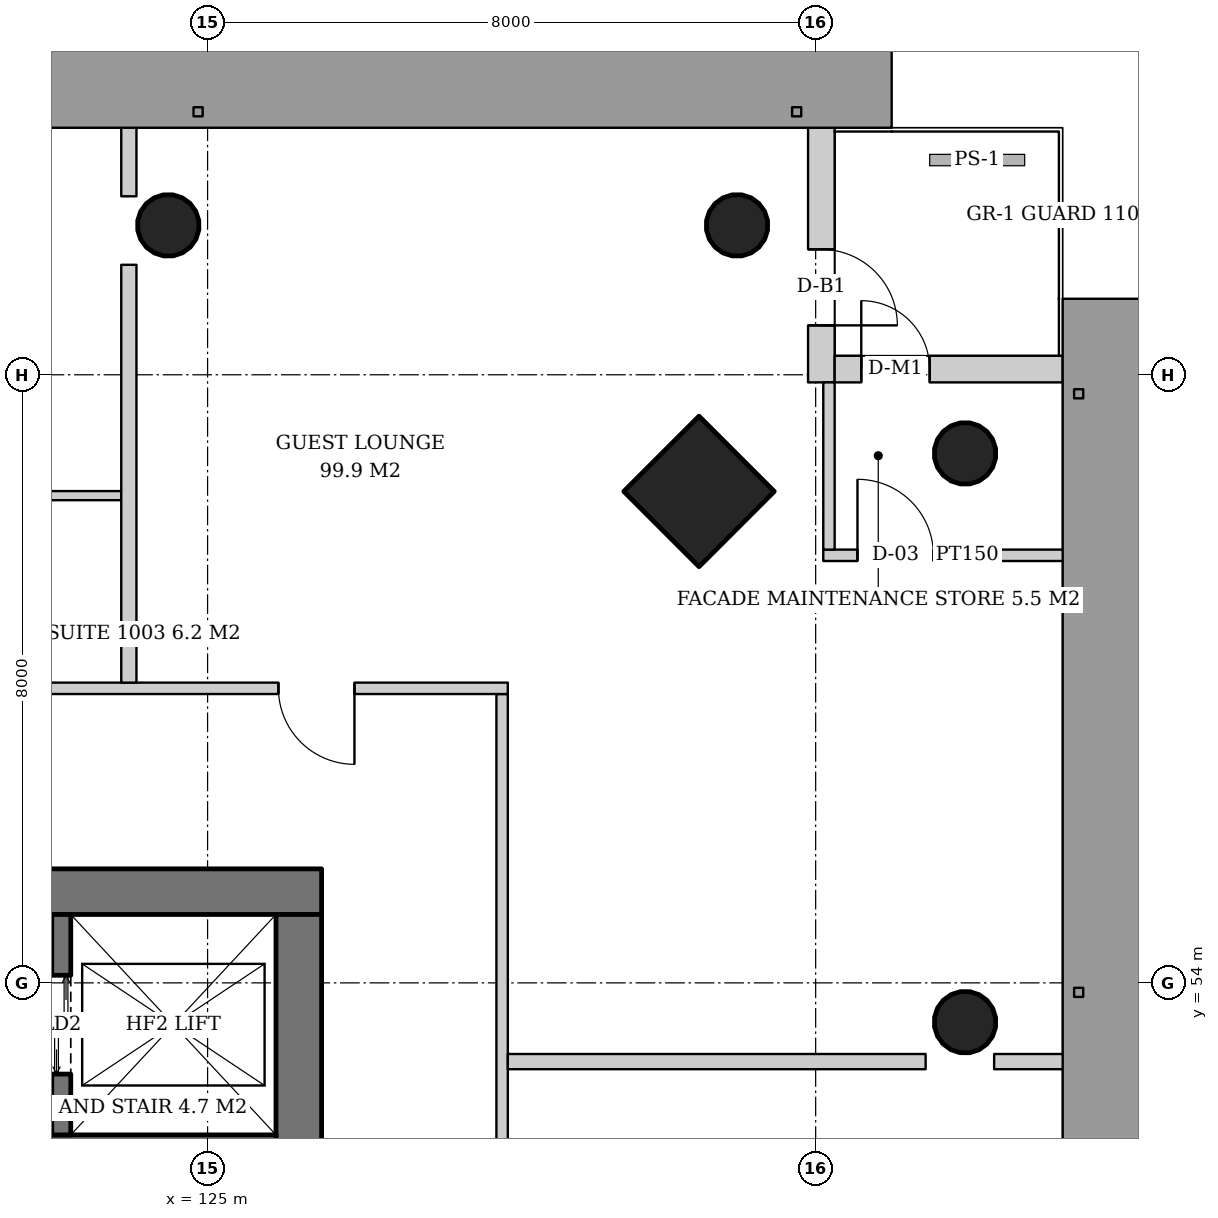
"""IFC4 building model, lengths in metres.
Left out: names, types, materials, properties, quantities, classifications, styles, units other than length and angle.
Written with IfcOpenShell. Run it as: python <this file> out.ifc"""

import sys

from ifc_helpers import new_model, si_unit, direction, frame, frame_2d, origin, origin_2d, place, context, subcontext, project, spatial, rectangle, hollow_circle, extrude, element, fill, save


model = new_model("IFC4")
c1 = context("Model", 3, precision=1e-05, world=origin(), true_north=direction((0.0, 1.0)))
c2 = subcontext(c1, "Body", "Model", "MODEL_VIEW")
j1 = project(units=[si_unit("LENGTHUNIT", "METRE"), si_unit("PLANEANGLEUNIT", "RADIAN")], contexts=[c1])
p1 = place(None, origin())
s1 = spatial("IfcSite", under=j1, at=p1, CompositionType="ELEMENT")
p2 = place(p1, origin())
s2 = spatial("IfcBuilding", under=s1, at=p2, CompositionType="ELEMENT")
p3 = place(p2, frame((0.0, 0.0, 43.8)))
s3 = spatial("IfcBuildingStorey", under=s2, at=p3, CompositionType="ELEMENT", Elevation=43.8)
p4 = place(p3, frame((131.517, 60.517, 0.0), z_axis=(-0.043029647111, -0.043029647111, 0.998146732169), x_axis=(0.707106781187, -0.707106781187, 0.0)))
e1 = element("IfcColumn", 1, at=p4, inside=s3, PredefinedType="COLUMN", context=c2, shape_type="SweptSolid", body=[
    extrude(rectangle(XDim=1.4, YDim=1.4, at=origin_2d()), origin(), (0.0, 0.0, 1.0), 3.807),
])
p5 = place(p3, frame((135.017, 61.017, 0.0), z_axis=(-0.043029647111, -0.043029647111, 0.998146732169), x_axis=(0.707106781187, -0.707106781187, 0.0)))
e2 = element("IfcColumn", 2, at=p5, inside=s3, PredefinedType="COLUMN", context=c2, shape_type="SweptSolid", body=[
    extrude(hollow_circle(Radius=0.406, WallThickness=0.03, at=origin_2d()), origin(), (0.0, 0.0, 1.0), 3.807),
])
p6 = place(p3, frame((135.017, 53.509, 0.0), z_axis=(-0.043059584825, -0.021497706284, 0.998841188968), x_axis=(0.446680166538, -0.894693706707, 0.0)))
e3 = element("IfcColumn", 3, at=p6, inside=s3, PredefinedType="COLUMN", context=c2, shape_type="SweptSolid", body=[
    extrude(hollow_circle(Radius=0.406, WallThickness=0.03, at=origin_2d()), origin(), (0.0, 0.0, 1.0), 3.804),
])
p7 = place(p3, frame((132.017, 64.017, 0.0), z_axis=(-0.043029647111, -0.043029647111, 0.998146732169), x_axis=(0.707106781187, -0.707106781187, 0.0)))
e4 = element("IfcColumn", 4, at=p7, inside=s3, PredefinedType="COLUMN", context=c2, shape_type="SweptSolid", body=[
    extrude(hollow_circle(Radius=0.406, WallThickness=0.03, at=origin_2d()), origin(), (0.0, 0.0, 1.0), 3.807),
])
p8 = place(p3, frame((124.509, 64.017, 0.0), z_axis=(-0.021497706284, -0.043059584825, 0.998841188968), x_axis=(0.894693706707, -0.446680166538, 0.0)))
e5 = element("IfcColumn", 5, at=p8, inside=s3, PredefinedType="COLUMN", context=c2, shape_type="SweptSolid", body=[
    extrude(hollow_circle(Radius=0.406, WallThickness=0.03, at=origin_2d()), origin(), (0.0, 0.0, 1.0), 3.804),
])
p9 = place(p3, frame((107.5, 55.2, 0.0), z_axis=(0.0, 0.0, 1.0), x_axis=(1.0, 0.0, 0.0)))
e6 = element("IfcWall", 6, at=p9, inside=s3, PredefinedType="SHEAR", context=c2, shape_type="SweptSolid", body=[
    extrude(rectangle(XDim=19.0, YDim=0.6, at=frame_2d((9.5, 0.0))), origin(), (0.0, 0.0, 1.0), 3.8),
])
p10 = place(p9, frame((14.14, 0.0, 0.0)))
e7 = element("IfcOpeningElement", 7, at=p10, cuts=e6, PredefinedType="OPENING", context=c2, shape_type="SweptSolid", body=[
    extrude(rectangle(XDim=1.0, YDim=2.1, at=frame_2d((0.5, 1.05))), frame((0.0, 0.31, 0.0), z_axis=(0.0, -1.0, 0.0), x_axis=(1.0, 0.0, 0.0)), (0.0, 0.0, 1.0), 0.62),
])
p11 = place(p9, frame((2.425, 0.0, 0.0)))
e8 = element("IfcOpeningElement", 8, at=p11, cuts=e6, PredefinedType="OPENING", context=c2, shape_type="SweptSolid", body=[
    extrude(rectangle(XDim=1.0, YDim=2.1, at=frame_2d((0.5, 1.05))), frame((0.0, 0.31, 0.0), z_axis=(0.0, -1.0, 0.0), x_axis=(1.0, 0.0, 0.0)), (0.0, 0.0, 1.0), 0.62),
])
p12 = place(p3, frame((126.2, 37.1, 0.0), z_axis=(0.0, 0.0, 1.0), x_axis=(0.0, 1.0, 0.0)))
e9 = element("IfcWall", 9, at=p12, inside=s3, PredefinedType="SHEAR", context=c2, shape_type="SweptSolid", body=[
    extrude(rectangle(XDim=17.8, YDim=0.6, at=frame_2d((8.9, 0.0))), origin(), (0.0, 0.0, 1.0), 3.8),
])
p13 = place(p12, frame((8.0, 0.0, 0.0)))
e10 = element("IfcOpeningElement", 10, at=p13, cuts=e9, PredefinedType="OPENING", context=c2, shape_type="SweptSolid", body=[
    extrude(rectangle(XDim=1.8, YDim=2.4, at=frame_2d((0.9, 1.2))), frame((0.0, 0.31, 0.0), z_axis=(0.0, -1.0, 0.0), x_axis=(1.0, 0.0, 0.0)), (0.0, 0.0, 1.0), 0.62),
])
p14 = place(p3, frame((108.1, 51.8, 0.0), z_axis=(0.0, 0.0, 1.0), x_axis=(1.0, 0.0, 0.0)))
e11 = element("IfcWall", 11, at=p14, inside=s3, PredefinedType="SHEAR", context=c2, shape_type="SweptSolid", body=[
    extrude(rectangle(XDim=17.8, YDim=0.4, at=frame_2d((8.9, 0.0))), origin(), (0.0, 0.0, 1.0), 3.8),
])
p15 = place(p3, frame((133.075, 65.25, 0.0), z_axis=(0.0, 0.0, 1.0), x_axis=(0.0, -1.0, 0.0)))
e12 = element("IfcWall", 12, at=p15, inside=s3, PredefinedType="SOLIDWALL", context=c2, shape_type="SweptSolid", body=[
    extrude(rectangle(XDim=3.35, YDim=0.35, at=frame_2d((1.675, 0.0))), origin(), (0.0, 0.0, 1.0), 3.6),
])
p16 = place(p15, frame((1.6, 0.0, 0.0)))
e13 = element("IfcOpeningElement", 13, at=p16, cuts=e12, PredefinedType="OPENING", context=c2, shape_type="SweptSolid", body=[
    extrude(rectangle(XDim=1.0, YDim=2.4, at=frame_2d((0.5, 1.2))), frame((0.0, 0.185, 0.0), z_axis=(0.0, -1.0, 0.0), x_axis=(1.0, 0.0, 0.0)), (0.0, 0.0, 1.0), 0.37),
])
p17 = place(p3, frame((133.25, 62.075, 0.0), z_axis=(0.0, 0.0, 1.0), x_axis=(1.0, 0.0, 0.0)))
e14 = element("IfcWall", 14, at=p17, inside=s3, PredefinedType="SOLIDWALL", context=c2, shape_type="SweptSolid", body=[
    extrude(rectangle(XDim=3.0, YDim=0.35, at=frame_2d((1.5, 0.0))), origin(), (0.0, 0.0, 1.0), 3.6),
])
p18 = place(p17, frame((0.35, 0.0, 0.0)))
e15 = element("IfcOpeningElement", 15, at=p18, cuts=e14, PredefinedType="OPENING", context=c2, shape_type="SweptSolid", body=[
    extrude(rectangle(XDim=0.9, YDim=2.1, at=frame_2d((0.45, 1.05))), frame((0.0, 0.185, 0.0), z_axis=(0.0, -1.0, 0.0), x_axis=(1.0, 0.0, 0.0)), (0.0, 0.0, 1.0), 0.37),
])
p19 = place(p3, frame((123.075, 52.0, 0.0), z_axis=(0.0, 0.0, 1.0), x_axis=(0.0, 1.0, 0.0)))
e16 = element("IfcWall", 16, at=p19, inside=s3, PredefinedType="SHEAR", context=c2, shape_type="SweptSolid", body=[
    extrude(rectangle(XDim=2.9, YDim=0.25, at=frame_2d((1.45, 0.0))), origin(), (0.0, 0.0, 1.0), 3.8),
])
p20 = place(p19, frame((0.8, 0.0, 0.0)))
e17 = element("IfcOpeningElement", 17, at=p20, cuts=e16, PredefinedType="OPENING", context=c2, shape_type="SweptSolid", body=[
    extrude(rectangle(XDim=1.3, YDim=2.2, at=frame_2d((0.65, 1.1))), frame((0.0, 0.135, 0.0), z_axis=(0.0, -1.0, 0.0), x_axis=(1.0, 0.0, 0.0)), (0.0, 0.0, 1.0), 0.27),
])
p21 = place(p3, frame((128.875, 34.05, 0.0), z_axis=(0.0, 0.0, 1.0), x_axis=(0.0, 1.0, 0.0)))
e18 = element("IfcWall", 18, at=p21, inside=s3, PredefinedType="PARTITIONING", context=c2, shape_type="SweptSolid", body=[
    extrude(rectangle(XDim=23.75, YDim=0.15, at=frame_2d((11.875, 0.0))), origin(), (0.0, 0.0, 1.0), 2.8),
])
p22 = place(p21, frame((2.068, 0.0, 0.0)))
e19 = element("IfcOpeningElement", 19, at=p22, cuts=e18, PredefinedType="OPENING", context=c2, shape_type="SweptSolid", body=[
    extrude(rectangle(XDim=0.9, YDim=2.1, at=frame_2d((0.45, 1.05))), frame((0.0, 0.085, 0.0), z_axis=(0.0, -1.0, 0.0), x_axis=(1.0, 0.0, 0.0)), (0.0, 0.0, 1.0), 0.17),
])
p23 = place(p21, frame((12.379, 0.0, 0.0)))
e20 = element("IfcOpeningElement", 20, at=p23, cuts=e18, PredefinedType="OPENING", context=c2, shape_type="SweptSolid", body=[
    extrude(rectangle(XDim=0.9, YDim=2.1, at=frame_2d((0.45, 1.05))), frame((0.0, 0.085, 0.0), z_axis=(0.0, -1.0, 0.0), x_axis=(1.0, 0.0, 0.0)), (0.0, 0.0, 1.0), 0.17),
])
p24 = place(p3, frame((128.95, 52.964, 0.0), z_axis=(0.0, 0.0, 1.0), x_axis=(1.0, 0.0, 0.0)))
e21 = element("IfcWall", 21, at=p24, inside=s3, PredefinedType="PARTITIONING", context=c2, shape_type="SweptSolid", body=[
    extrude(rectangle(XDim=5.497, YDim=0.2, at=frame_2d((2.749, 0.0))), origin(), (0.0, 0.0, 1.0), 3.6),
])
p25 = place(p3, frame((135.348, 52.964, 0.0), z_axis=(0.0, 0.0, 1.0), x_axis=(1.0, 0.0, 0.0)))
e22 = element("IfcWall", 22, at=p25, inside=s3, PredefinedType="PARTITIONING", context=c2, shape_type="SweptSolid", body=[
    extrude(rectangle(XDim=0.942, YDim=0.2, at=frame_2d((0.471, 0.0))), origin(), (0.0, 0.0, 1.0), 3.6),
])
p26 = place(p3, frame((123.864, 60.41, 0.0), z_axis=(0.0, 0.0, 1.0), x_axis=(-1.0, 0.0, 0.0)))
e23 = element("IfcWall", 23, at=p26, inside=s3, PredefinedType="PARTITIONING", context=c2, shape_type="SweptSolid", body=[
    extrude(rectangle(XDim=2.42, YDim=0.12, at=frame_2d((1.21, 0.0))), origin(), (0.0, 0.0, 1.0), 2.847),
])
p27 = place(p3, frame((128.95, 57.875, 0.0), z_axis=(0.0, 0.0, 1.0), x_axis=(-1.0, 0.0, 0.0)))
e24 = element("IfcWall", 24, at=p27, inside=s3, PredefinedType="PARTITIONING", context=c2, shape_type="SweptSolid", body=[
    extrude(rectangle(XDim=23.75, YDim=0.15, at=frame_2d((11.875, 0.0))), origin(), (0.0, 0.0, 1.0), 2.8),
])
p28 = place(p27, frame((2.018, 0.0, 0.0)))
e25 = element("IfcOpeningElement", 25, at=p28, cuts=e24, PredefinedType="OPENING", context=c2, shape_type="SweptSolid", body=[
    extrude(rectangle(XDim=1.0, YDim=2.1, at=frame_2d((0.5, 1.05))), frame((0.0, 0.085, 0.0), z_axis=(0.0, -1.0, 0.0), x_axis=(1.0, 0.0, 0.0)), (0.0, 0.0, 1.0), 0.17),
])
p29 = place(p27, frame((7.736, 0.0, 0.0)))
e26 = element("IfcOpeningElement", 26, at=p29, cuts=e24, PredefinedType="OPENING", context=c2, shape_type="SweptSolid", body=[
    extrude(rectangle(XDim=0.9, YDim=2.1, at=frame_2d((0.45, 1.05))), frame((0.0, 0.085, 0.0), z_axis=(0.0, -1.0, 0.0), x_axis=(1.0, 0.0, 0.0)), (0.0, 0.0, 1.0), 0.17),
])
p30 = place(p27, frame((17.021, 0.0, 0.0)))
e27 = element("IfcOpeningElement", 27, at=p30, cuts=e24, PredefinedType="OPENING", context=c2, shape_type="SweptSolid", body=[
    extrude(rectangle(XDim=0.9, YDim=2.1, at=frame_2d((0.45, 1.05))), frame((0.0, 0.085, 0.0), z_axis=(0.0, -1.0, 0.0), x_axis=(1.0, 0.0, 0.0)), (0.0, 0.0, 1.0), 0.17),
])
p31 = place(p3, frame((123.964, 57.95, 0.0), z_axis=(0.0, 0.0, 1.0), x_axis=(0.0, 1.0, 0.0)))
e28 = element("IfcWall", 28, at=p31, inside=s3, PredefinedType="PARTITIONING", context=c2, shape_type="SweptSolid", body=[
    extrude(rectangle(XDim=5.497, YDim=0.2, at=frame_2d((2.749, 0.0))), origin(), (0.0, 0.0, 1.0), 3.6),
])
p32 = place(p3, frame((123.964, 64.348, 0.0), z_axis=(0.0, 0.0, 1.0), x_axis=(0.0, 1.0, 0.0)))
e29 = element("IfcWall", 29, at=p32, inside=s3, PredefinedType="PARTITIONING", context=c2, shape_type="SweptSolid", body=[
    extrude(rectangle(XDim=0.942, YDim=0.2, at=frame_2d((0.471, 0.0))), origin(), (0.0, 0.0, 1.0), 3.6),
])
p33 = place(p3, frame((133.1, 59.625, 0.0), z_axis=(0.0, 0.0, 1.0), x_axis=(1.0, 0.0, 0.0)))
e30 = element("IfcWall", 30, at=p33, inside=s3, PredefinedType="PARTITIONING", context=c2, shape_type="SweptSolid", body=[
    extrude(rectangle(XDim=3.19, YDim=0.15, at=frame_2d((1.595, 0.0))), origin(), (0.0, 0.0, 1.0), 3.05),
])
p34 = place(p33, frame((0.45, 0.0, 0.0)))
e31 = element("IfcOpeningElement", 31, at=p34, cuts=e30, PredefinedType="OPENING", context=c2, shape_type="SweptSolid", body=[
    extrude(rectangle(XDim=1.0, YDim=2.1, at=frame_2d((0.5, 1.05))), frame((0.0, 0.085, 0.0), z_axis=(0.0, -1.0, 0.0), x_axis=(1.0, 0.0, 0.0)), (0.0, 0.0, 1.0), 0.17),
])
p35 = place(p3, frame((133.175, 59.7, 0.0), z_axis=(0.0, 0.0, 1.0), x_axis=(0.0, 1.0, 0.0)))
e32 = element("IfcWall", 32, at=p35, inside=s3, PredefinedType="PARTITIONING", context=c2, shape_type="SweptSolid", body=[
    extrude(rectangle(XDim=2.2, YDim=0.15, at=frame_2d((1.1, 0.0))), origin(), (0.0, 0.0, 1.0), 3.2),
])
p36 = place(p18, origin())
e33 = element("IfcDoor", 33, at=p36, inside=s3, OperationType="SINGLE_SWING_LEFT", PredefinedType="DOOR", context=c2, shape_type="SweptSolid", body=[
    extrude(rectangle(XDim=0.9, YDim=2.1, at=frame_2d((0.45, 1.05))), frame((0.0, 0.025, 0.0), z_axis=(0.0, -1.0, 0.0), x_axis=(1.0, 0.0, 0.0)), (0.0, 0.0, 1.0), 0.05),
])
fill(e15, e33)
p37 = place(p16, origin())
e34 = element("IfcDoor", 34, at=p37, inside=s3, OperationType="SINGLE_SWING_RIGHT", PredefinedType="DOOR", context=c2, shape_type="SweptSolid", body=[
    extrude(rectangle(XDim=1.0, YDim=2.4, at=frame_2d((0.5, 1.2))), frame((0.0, 0.025, 0.0), z_axis=(0.0, -1.0, 0.0), x_axis=(1.0, 0.0, 0.0)), (0.0, 0.0, 1.0), 0.05),
])
fill(e13, e34)
p38 = place(p20, origin())
e35 = element("IfcDoor", 35, at=p38, inside=s3, OperationType="DOUBLE_DOOR_SLIDING", PredefinedType="DOOR", context=c2, shape_type="SweptSolid", body=[
    extrude(rectangle(XDim=1.3, YDim=2.2, at=frame_2d((0.65, 1.1))), frame((0.0, 0.025, 0.0), z_axis=(0.0, -1.0, 0.0), x_axis=(1.0, 0.0, 0.0)), (0.0, 0.0, 1.0), 0.05),
])
fill(e17, e35)
p39 = place(p28, origin())
e36 = element("IfcDoor", 36, at=p39, inside=s3, OperationType="SINGLE_SWING_LEFT", PredefinedType="DOOR", context=c2, shape_type="SweptSolid", body=[
    extrude(rectangle(XDim=1.0, YDim=2.1, at=frame_2d((0.5, 1.05))), frame((0.0, 0.025, 0.0), z_axis=(0.0, -1.0, 0.0), x_axis=(1.0, 0.0, 0.0)), (0.0, 0.0, 1.0), 0.05),
])
fill(e25, e36)
p40 = place(p34, origin())
e37 = element("IfcDoor", 37, at=p40, inside=s3, OperationType="SINGLE_SWING_LEFT", PredefinedType="DOOR", context=c2, shape_type="SweptSolid", body=[
    extrude(rectangle(XDim=1.0, YDim=2.1, at=frame_2d((0.5, 1.05))), frame((0.0, 0.025, 0.0), z_axis=(0.0, -1.0, 0.0), x_axis=(1.0, 0.0, 0.0)), (0.0, 0.0, 1.0), 0.05),
])
fill(e31, e37)
save(model, sys.argv[1])
